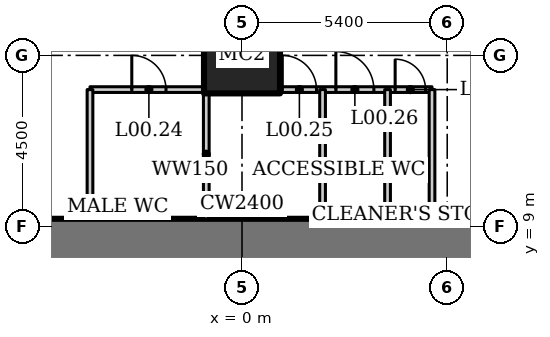
"""IFC4 building model, lengths in metres.
Left out: names, types, materials, properties, quantities, classifications, styles, units other than length and angle.
Written with IfcOpenShell. Run it as: python <this file> out.ifc"""

import sys

from ifc_helpers import new_model, si_unit, direction, frame, frame_2d, origin, origin_2d, place, context, subcontext, project, spatial, rectangle, hollow_rectangle, extrude, element, fill, save


model = new_model("IFC4")
c1 = context("Model", 3, precision=1e-05, world=origin(), true_north=direction((0.0, 1.0)))
c2 = subcontext(c1, "Body", "Model", "MODEL_VIEW")
j1 = project(units=[si_unit("LENGTHUNIT", "METRE"), si_unit("PLANEANGLEUNIT", "RADIAN")], contexts=[c1])
p1 = place(None, origin())
s1 = spatial("IfcSite", under=j1, at=p1, CompositionType="ELEMENT")
p2 = place(p1, origin())
s2 = spatial("IfcBuilding", under=s1, at=p2, CompositionType="ELEMENT")
p3 = place(p2, origin())
s3 = spatial("IfcBuildingStorey", under=s2, at=p3, CompositionType="ELEMENT", Elevation=0.0)
p4 = place(p3, frame((0.0, 13.5, 0.0), z_axis=(0.0, 0.0, 1.0), x_axis=(1.0, 0.0, 0.0)))
e1 = element("IfcColumn", 1, at=p4, inside=s3, PredefinedType="COLUMN", context=c2, shape_type="SweptSolid", body=[
    extrude(hollow_rectangle(XDim=2.0, YDim=2.0, WallThickness=0.17, at=origin_2d()), origin(), (0.0, 0.0, 1.0), 6.5),
])
p5 = place(p3, frame((12.2, 8.0, 0.0), z_axis=(0.0, 0.0, 1.0), x_axis=(-1.0, 0.0, 0.0)))
e2 = element("IfcWall", 2, at=p5, inside=s3, PredefinedType="SHEAR", context=c2, shape_type="SweptSolid", body=[
    extrude(rectangle(XDim=24.4, YDim=2.4, at=frame_2d((12.2, 0.0))), origin(), (0.0, 0.0, 1.0), 6.5),
])
p6 = place(p3, frame((-4.0, 12.6, 0.0), z_axis=(0.0, 0.0, 1.0), x_axis=(1.0, 0.0, 0.0)))
e3 = element("IfcWall", 3, at=p6, inside=s3, PredefinedType="SOLIDWALL", context=c2, shape_type="SweptSolid", body=[
    extrude(rectangle(XDim=9.0, YDim=0.15, at=frame_2d((4.5, 0.0))), origin(), (0.0, 0.0, 1.0), 6.3),
])
p7 = place(p6, frame((1.1, 0.0, 0.0)))
e4 = element("IfcOpeningElement", 4, at=p7, cuts=e3, PredefinedType="OPENING", context=c2, shape_type="SweptSolid", body=[
    extrude(rectangle(XDim=0.9, YDim=2.1, at=frame_2d((0.45, 1.05))), frame((0.0, 0.085, 0.0), z_axis=(0.0, -1.0, 0.0), x_axis=(1.0, 0.0, 0.0)), (0.0, 0.0, 1.0), 0.17),
])
p8 = place(p6, frame((5.06, 0.0, 0.0)))
e5 = element("IfcOpeningElement", 5, at=p8, cuts=e3, PredefinedType="OPENING", context=c2, shape_type="SweptSolid", body=[
    extrude(rectangle(XDim=0.9, YDim=2.1, at=frame_2d((0.45, 1.05))), frame((0.0, 0.085, 0.0), z_axis=(0.0, -1.0, 0.0), x_axis=(1.0, 0.0, 0.0)), (0.0, 0.0, 1.0), 0.17),
])
p9 = place(p6, frame((6.47, 0.0, 0.0)))
e6 = element("IfcOpeningElement", 6, at=p9, cuts=e3, PredefinedType="OPENING", context=c2, shape_type="SweptSolid", body=[
    extrude(rectangle(XDim=1.0, YDim=2.1, at=frame_2d((0.5, 1.05))), frame((0.0, 0.085, 0.0), z_axis=(0.0, -1.0, 0.0), x_axis=(1.0, 0.0, 0.0)), (0.0, 0.0, 1.0), 0.17),
])
p10 = place(p6, frame((8.03, 0.0, 0.0)))
e7 = element("IfcOpeningElement", 7, at=p10, cuts=e3, PredefinedType="OPENING", context=c2, shape_type="SweptSolid", body=[
    extrude(rectangle(XDim=0.8, YDim=2.1, at=frame_2d((0.4, 1.05))), frame((0.0, 0.085, 0.0), z_axis=(0.0, -1.0, 0.0), x_axis=(1.0, 0.0, 0.0)), (0.0, 0.0, 1.0), 0.17),
])
for number, where, z_axis, x_axis in (
    (8, (-4.0, 9.2, 0.0), (0.0, 0.0, 1.0), (0.0, 1.0, 0.0)),
    (9, (5.0, 9.2, 0.0), (0.0, 0.0, 1.0), (0.0, 1.0, 0.0)),
    (10, (-0.94, 9.2, 0.0), (0.0, 0.0, 1.0), (0.0, 1.0, 0.0)),
):
    element("IfcWall", number, at=place(p3, frame(where, z_axis=z_axis, x_axis=x_axis)), inside=s3, PredefinedType="SOLIDWALL", context=c2, shape_type="SweptSolid", body=[
        extrude(rectangle(XDim=3.4, YDim=0.15, at=frame_2d((1.7, 0.0))), origin(), (0.0, 0.0, 1.0), 6.3),
    ])
p11 = place(p3, frame((2.12, 9.2, 0.0), z_axis=(0.0, 0.0, 1.0), x_axis=(0.0, 1.0, 0.0)))
e11 = element("IfcWall", 11, at=p11, inside=s3, PredefinedType="SOLIDWALL", context=c2, shape_type="SweptSolid", body=[
    extrude(rectangle(XDim=3.4, YDim=0.15, at=frame_2d((1.7, 0.0))), origin(), (0.0, 0.0, 1.0), 4.8),
])
p12 = place(p3, frame((3.83, 9.2, 0.0), z_axis=(0.0, 0.0, 1.0), x_axis=(0.0, 1.0, 0.0)))
e12 = element("IfcWall", 12, at=p12, inside=s3, PredefinedType="SOLIDWALL", context=c2, shape_type="SweptSolid", body=[
    extrude(rectangle(XDim=3.4, YDim=0.15, at=frame_2d((1.7, 0.0))), origin(), (0.0, 0.0, 1.0), 6.3),
])
p13 = place(p7, origin())
e13 = element("IfcDoor", 13, at=p13, inside=s3, OperationType="SINGLE_SWING_LEFT", PredefinedType="DOOR", context=c2, shape_type="SweptSolid", body=[
    extrude(rectangle(XDim=0.9, YDim=2.1, at=frame_2d((0.45, 1.05))), frame((0.0, 0.025, 0.0), z_axis=(0.0, -1.0, 0.0), x_axis=(1.0, 0.0, 0.0)), (0.0, 0.0, 1.0), 0.05),
])
fill(e4, e13)
p14 = place(p8, origin())
e14 = element("IfcDoor", 14, at=p14, inside=s3, OperationType="SINGLE_SWING_LEFT", PredefinedType="DOOR", context=c2, shape_type="SweptSolid", body=[
    extrude(rectangle(XDim=0.9, YDim=2.1, at=frame_2d((0.45, 1.05))), frame((0.0, 0.025, 0.0), z_axis=(0.0, -1.0, 0.0), x_axis=(1.0, 0.0, 0.0)), (0.0, 0.0, 1.0), 0.05),
])
fill(e5, e14)
p15 = place(p9, origin())
e15 = element("IfcDoor", 15, at=p15, inside=s3, OperationType="SINGLE_SWING_LEFT", PredefinedType="DOOR", context=c2, shape_type="SweptSolid", body=[
    extrude(rectangle(XDim=1.0, YDim=2.1, at=frame_2d((0.5, 1.05))), frame((0.0, 0.025, 0.0), z_axis=(0.0, -1.0, 0.0), x_axis=(1.0, 0.0, 0.0)), (0.0, 0.0, 1.0), 0.05),
])
fill(e6, e15)
p16 = place(p10, origin())
e16 = element("IfcDoor", 16, at=p16, inside=s3, OperationType="SINGLE_SWING_LEFT", PredefinedType="DOOR", context=c2, shape_type="SweptSolid", body=[
    extrude(rectangle(XDim=0.8, YDim=2.1, at=frame_2d((0.4, 1.05))), frame((0.0, 0.025, 0.0), z_axis=(0.0, -1.0, 0.0), x_axis=(1.0, 0.0, 0.0)), (0.0, 0.0, 1.0), 0.05),
])
fill(e7, e16)
save(model, sys.argv[1])
